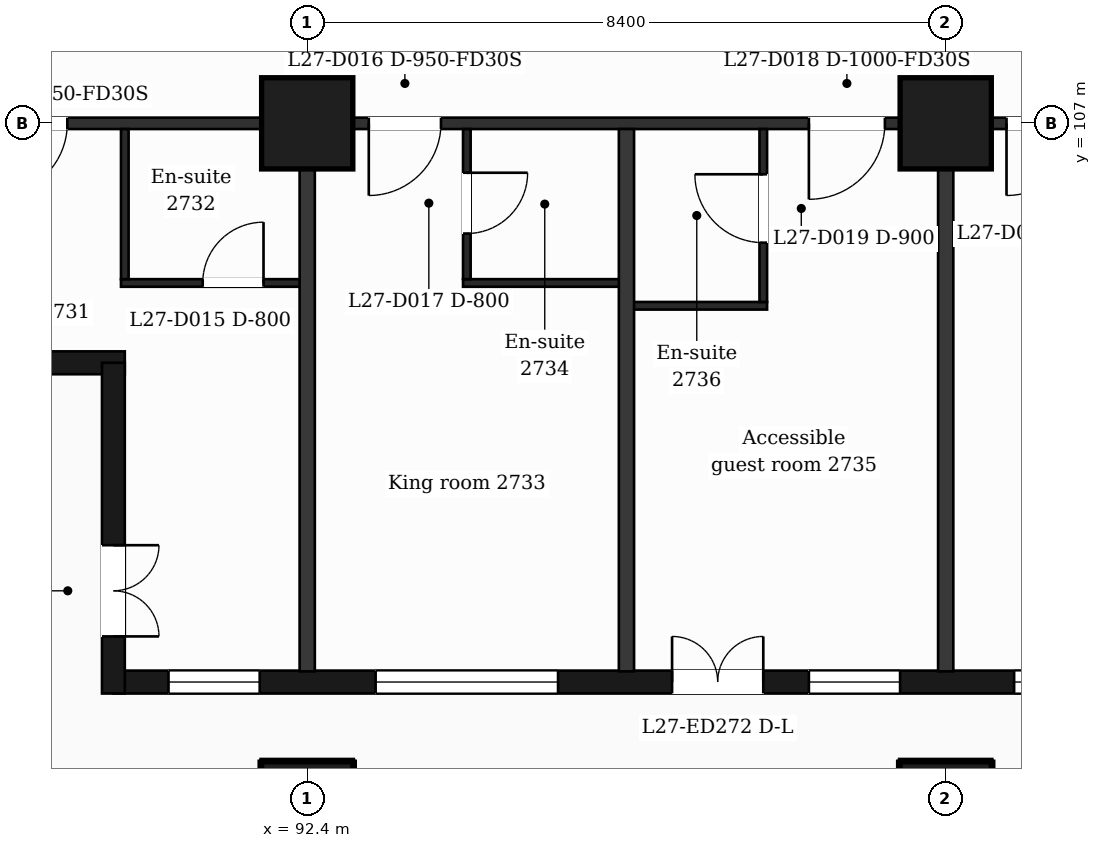
"""IFC4 building model, lengths in metres.
Left out: names, types, materials, properties, quantities, classifications, styles, units other than length and angle.
Written with IfcOpenShell. Run it as: python <this file> out.ifc"""

import sys

from ifc_helpers import new_model, si_unit, direction, frame, frame_2d, origin, origin_2d, place, context, subcontext, project, spatial, rectangle, extrude, element, fill, save


model = new_model("IFC4")
c1 = context("Model", 3, precision=1e-05, world=origin(), true_north=direction((0.0, 1.0)))
c2 = subcontext(c1, "Body", "Model", "MODEL_VIEW")
j1 = project(units=[si_unit("LENGTHUNIT", "METRE"), si_unit("PLANEANGLEUNIT", "RADIAN")], contexts=[c1])
p1 = place(None, origin())
s1 = spatial("IfcSite", under=j1, at=p1, CompositionType="ELEMENT")
p2 = place(p1, origin())
s2 = spatial("IfcBuilding", under=s1, at=p2, CompositionType="ELEMENT")
p3 = place(p2, frame((0.0, 0.0, 116.9)))
s3 = spatial("IfcBuildingStorey", under=s2, at=p3, CompositionType="ELEMENT", Elevation=116.9)
for number, where, z_axis, x_axis in (
    (1, (92.4, 98.0, 0.0), (0.0, 0.0, 1.0), (1.0, 0.0, 0.0)),
    (2, (100.8, 98.0, 0.0), (0.0, 0.0, 1.0), (1.0, 0.0, 0.0)),
    (3, (92.4, 107.0, 0.0), (0.0, 0.0, 1.0), (1.0, 0.0, 0.0)),
    (4, (100.8, 107.0, 0.0), (0.0, 0.0, 1.0), (1.0, 0.0, 0.0)),
):
    element("IfcColumn", number, at=place(p3, frame(where, z_axis=z_axis, x_axis=x_axis)), inside=s3, PredefinedType="COLUMN", context=c2, shape_type="SweptSolid", body=[
        extrude(rectangle(XDim=1.2, YDim=1.2, at=origin_2d()), origin(), (0.0, 0.0, 1.0), 3.7),
    ])
p4 = place(p3, frame((89.85, 99.65, 0.0), z_axis=(0.0, 0.0, 1.0), x_axis=(1.0, 0.0, 0.0)))
e5 = element("IfcWall", 5, at=p4, inside=s3, PredefinedType="SOLIDWALL", context=c2, shape_type="SweptSolid", body=[
    extrude(rectangle(XDim=47.25, YDim=0.3, at=frame_2d((23.625, 0.0))), origin(), (0.0, 0.0, 1.0), 3.38),
])
p5 = place(p4, frame((0.725, 0.0, 0.9)))
e6 = element("IfcOpeningElement", 6, at=p5, cuts=e5, PredefinedType="OPENING", context=c2, shape_type="SweptSolid", body=[
    extrude(rectangle(XDim=1.2, YDim=2.1, at=frame_2d((0.6, 1.05))), frame((0.0, 0.16, 0.0), z_axis=(0.0, -1.0, 0.0), x_axis=(1.0, 0.0, 0.0)), (0.0, 0.0, 1.0), 0.32),
])
p6 = place(p4, frame((3.45, 0.0, 0.9)))
e7 = element("IfcOpeningElement", 7, at=p6, cuts=e5, PredefinedType="OPENING", context=c2, shape_type="SweptSolid", body=[
    extrude(rectangle(XDim=2.4, YDim=2.1, at=frame_2d((1.2, 1.05))), frame((0.0, 0.16, 0.0), z_axis=(0.0, -1.0, 0.0), x_axis=(1.0, 0.0, 0.0)), (0.0, 0.0, 1.0), 0.32),
])
p7 = place(p4, frame((7.35, 0.0, 0.0)))
e8 = element("IfcOpeningElement", 8, at=p7, cuts=e5, PredefinedType="OPENING", context=c2, shape_type="SweptSolid", body=[
    extrude(rectangle(XDim=1.2, YDim=2.4, at=frame_2d((0.6, 1.2))), frame((0.0, 0.16, 0.0), z_axis=(0.0, -1.0, 0.0), x_axis=(1.0, 0.0, 0.0)), (0.0, 0.0, 1.0), 0.32),
])
p8 = place(p4, frame((9.15, 0.0, 0.9)))
e9 = element("IfcOpeningElement", 9, at=p8, cuts=e5, PredefinedType="OPENING", context=c2, shape_type="SweptSolid", body=[
    extrude(rectangle(XDim=1.2, YDim=2.1, at=frame_2d((0.6, 1.05))), frame((0.0, 0.16, 0.0), z_axis=(0.0, -1.0, 0.0), x_axis=(1.0, 0.0, 0.0)), (0.0, 0.0, 1.0), 0.32),
])
p9 = place(p4, frame((11.85, 0.0, 0.9)))
e10 = element("IfcOpeningElement", 10, at=p9, cuts=e5, PredefinedType="OPENING", context=c2, shape_type="SweptSolid", body=[
    extrude(rectangle(XDim=2.4, YDim=2.1, at=frame_2d((1.2, 1.05))), frame((0.0, 0.16, 0.0), z_axis=(0.0, -1.0, 0.0), x_axis=(1.0, 0.0, 0.0)), (0.0, 0.0, 1.0), 0.32),
])
p10 = place(p4, frame((16.05, 0.0, 0.9)))
e11 = element("IfcOpeningElement", 11, at=p10, cuts=e5, PredefinedType="OPENING", context=c2, shape_type="SweptSolid", body=[
    extrude(rectangle(XDim=2.4, YDim=2.1, at=frame_2d((1.2, 1.05))), frame((0.0, 0.16, 0.0), z_axis=(0.0, -1.0, 0.0), x_axis=(1.0, 0.0, 0.0)), (0.0, 0.0, 1.0), 0.32),
])
p11 = place(p4, frame((20.85, 0.0, 0.9)))
e12 = element("IfcOpeningElement", 12, at=p11, cuts=e5, PredefinedType="OPENING", context=c2, shape_type="SweptSolid", body=[
    extrude(rectangle(XDim=1.2, YDim=2.1, at=frame_2d((0.6, 1.05))), frame((0.0, 0.16, 0.0), z_axis=(0.0, -1.0, 0.0), x_axis=(1.0, 0.0, 0.0)), (0.0, 0.0, 1.0), 0.32),
])
p12 = place(p4, frame((25.05, 0.0, 0.9)))
e13 = element("IfcOpeningElement", 13, at=p12, cuts=e5, PredefinedType="OPENING", context=c2, shape_type="SweptSolid", body=[
    extrude(rectangle(XDim=1.2, YDim=2.1, at=frame_2d((0.6, 1.05))), frame((0.0, 0.16, 0.0), z_axis=(0.0, -1.0, 0.0), x_axis=(1.0, 0.0, 0.0)), (0.0, 0.0, 1.0), 0.32),
])
p13 = place(p4, frame((28.65, 0.0, 0.9)))
e14 = element("IfcOpeningElement", 14, at=p13, cuts=e5, PredefinedType="OPENING", context=c2, shape_type="SweptSolid", body=[
    extrude(rectangle(XDim=2.4, YDim=2.1, at=frame_2d((1.2, 1.05))), frame((0.0, 0.16, 0.0), z_axis=(0.0, -1.0, 0.0), x_axis=(1.0, 0.0, 0.0)), (0.0, 0.0, 1.0), 0.32),
])
p14 = place(p4, frame((32.85, 0.0, 0.9)))
e15 = element("IfcOpeningElement", 15, at=p14, cuts=e5, PredefinedType="OPENING", context=c2, shape_type="SweptSolid", body=[
    extrude(rectangle(XDim=2.4, YDim=2.1, at=frame_2d((1.2, 1.05))), frame((0.0, 0.16, 0.0), z_axis=(0.0, -1.0, 0.0), x_axis=(1.0, 0.0, 0.0)), (0.0, 0.0, 1.0), 0.32),
])
p15 = place(p4, frame((37.05, 0.0, 0.9)))
e16 = element("IfcOpeningElement", 16, at=p15, cuts=e5, PredefinedType="OPENING", context=c2, shape_type="SweptSolid", body=[
    extrude(rectangle(XDim=2.4, YDim=2.1, at=frame_2d((1.2, 1.05))), frame((0.0, 0.16, 0.0), z_axis=(0.0, -1.0, 0.0), x_axis=(1.0, 0.0, 0.0)), (0.0, 0.0, 1.0), 0.32),
])
p16 = place(p4, frame((41.25, 0.0, 0.9)))
e17 = element("IfcOpeningElement", 17, at=p16, cuts=e5, PredefinedType="OPENING", context=c2, shape_type="SweptSolid", body=[
    extrude(rectangle(XDim=2.4, YDim=2.1, at=frame_2d((1.2, 1.05))), frame((0.0, 0.16, 0.0), z_axis=(0.0, -1.0, 0.0), x_axis=(1.0, 0.0, 0.0)), (0.0, 0.0, 1.0), 0.32),
])
p17 = place(p4, frame((45.25, 0.0, 0.9)))
e18 = element("IfcOpeningElement", 18, at=p17, cuts=e5, PredefinedType="OPENING", context=c2, shape_type="SweptSolid", body=[
    extrude(rectangle(XDim=1.2, YDim=2.1, at=frame_2d((0.6, 1.05))), frame((0.0, 0.16, 0.0), z_axis=(0.0, -1.0, 0.0), x_axis=(1.0, 0.0, 0.0)), (0.0, 0.0, 1.0), 0.32),
])
p18 = place(p3, frame((86.452, 103.85, 0.0), z_axis=(0.0, 0.0, 1.0), x_axis=(1.0, 0.0, 0.0)))
e19 = element("IfcWall", 19, at=p18, inside=s3, PredefinedType="SOLIDWALL", context=c2, shape_type="SweptSolid", body=[
    extrude(rectangle(XDim=3.548, YDim=0.3, at=frame_2d((1.774, 0.0))), origin(), (0.0, 0.0, 1.0), 3.38),
])
p19 = place(p3, frame((89.85, 103.85, 0.0), z_axis=(0.0, 0.0, 1.0), x_axis=(0.0, -1.0, 0.0)))
e20 = element("IfcWall", 20, at=p19, inside=s3, PredefinedType="SOLIDWALL", context=c2, shape_type="SweptSolid", body=[
    extrude(rectangle(XDim=4.35, YDim=0.3, at=frame_2d((2.175, 0.0))), origin(), (0.0, 0.0, 1.0), 3.38),
])
p20 = place(p19, frame((2.4, 0.0, 0.0)))
e21 = element("IfcOpeningElement", 21, at=p20, cuts=e20, PredefinedType="OPENING", context=c2, shape_type="SweptSolid", body=[
    extrude(rectangle(XDim=1.2, YDim=2.4, at=frame_2d((0.6, 1.2))), frame((0.0, 0.16, 0.0), z_axis=(0.0, -1.0, 0.0), x_axis=(1.0, 0.0, 0.0)), (0.0, 0.0, 1.0), 0.32),
])
p21 = place(p3, frame((96.6, 104.6, 0.0), z_axis=(0.0, 0.0, 1.0), x_axis=(1.0, 0.0, 0.0)))
e22 = element("IfcWall", 22, at=p21, inside=s3, PredefinedType="PARTITIONING", context=c2, shape_type="SweptSolid", body=[
    extrude(rectangle(XDim=1.85, YDim=0.1, at=frame_2d((0.925, 0.0))), origin(), (0.0, 0.0, 1.0), 3.38),
])
p22 = place(p3, frame((89.95, 104.9, 0.0), z_axis=(0.0, 0.0, 1.0), x_axis=(1.0, 0.0, 0.0)))
e23 = element("IfcWall", 23, at=p22, inside=s3, PredefinedType="PARTITIONING", context=c2, shape_type="SweptSolid", body=[
    extrude(rectangle(XDim=2.45, YDim=0.1, at=frame_2d((1.225, 0.0))), origin(), (0.0, 0.0, 1.0), 3.38),
])
p23 = place(p22, frame((1.075, 0.0, 0.0)))
e24 = element("IfcOpeningElement", 24, at=p23, cuts=e23, PredefinedType="OPENING", context=c2, shape_type="SweptSolid", body=[
    extrude(rectangle(XDim=0.8, YDim=2.1, at=frame_2d((0.4, 1.05))), frame((0.0, 0.06, 0.0), z_axis=(0.0, -1.0, 0.0), x_axis=(1.0, 0.0, 0.0)), (0.0, 0.0, 1.0), 0.12),
])
p24 = place(p3, frame((94.45, 104.9, 0.0), z_axis=(0.0, 0.0, 1.0), x_axis=(1.0, 0.0, 0.0)))
e25 = element("IfcWall", 25, at=p24, inside=s3, PredefinedType="PARTITIONING", context=c2, shape_type="SweptSolid", body=[
    extrude(rectangle(XDim=2.15, YDim=0.1, at=frame_2d((1.075, 0.0))), origin(), (0.0, 0.0, 1.0), 3.38),
])
p25 = place(p3, frame((87.018, 107.0, 0.0), z_axis=(0.0, 0.0, 1.0), x_axis=(1.0, 0.0, 0.0)))
e26 = element("IfcWall", 26, at=p25, inside=s3, PredefinedType="PARTITIONING", context=c2, shape_type="SweptSolid", body=[
    extrude(rectangle(XDim=52.765, YDim=0.15, at=frame_2d((26.382, 0.0))), origin(), (0.0, 0.0, 1.0), 3.38),
])
p26 = place(p25, frame((1.276, 0.0, 0.0)))
e27 = element("IfcOpeningElement", 27, at=p26, cuts=e26, PredefinedType="OPENING", context=c2, shape_type="SweptSolid", body=[
    extrude(rectangle(XDim=0.95, YDim=2.1, at=frame_2d((0.475, 1.05))), frame((0.0, 0.085, 0.0), z_axis=(0.0, -1.0, 0.0), x_axis=(1.0, 0.0, 0.0)), (0.0, 0.0, 1.0), 0.17),
])
p27 = place(p25, frame((6.192, 0.0, 0.0)))
e28 = element("IfcOpeningElement", 28, at=p27, cuts=e26, PredefinedType="OPENING", context=c2, shape_type="SweptSolid", body=[
    extrude(rectangle(XDim=0.95, YDim=2.1, at=frame_2d((0.475, 1.05))), frame((0.0, 0.085, 0.0), z_axis=(0.0, -1.0, 0.0), x_axis=(1.0, 0.0, 0.0)), (0.0, 0.0, 1.0), 0.17),
])
p28 = place(p25, frame((11.982, 0.0, 0.0)))
e29 = element("IfcOpeningElement", 29, at=p28, cuts=e26, PredefinedType="OPENING", context=c2, shape_type="SweptSolid", body=[
    extrude(rectangle(XDim=1.0, YDim=2.1, at=frame_2d((0.5, 1.05))), frame((0.0, 0.085, 0.0), z_axis=(0.0, -1.0, 0.0), x_axis=(1.0, 0.0, 0.0)), (0.0, 0.0, 1.0), 0.17),
])
p29 = place(p25, frame((14.582, 0.0, 0.0)))
e30 = element("IfcOpeningElement", 30, at=p29, cuts=e26, PredefinedType="OPENING", context=c2, shape_type="SweptSolid", body=[
    extrude(rectangle(XDim=0.95, YDim=2.1, at=frame_2d((0.475, 1.05))), frame((0.0, 0.085, 0.0), z_axis=(0.0, -1.0, 0.0), x_axis=(1.0, 0.0, 0.0)), (0.0, 0.0, 1.0), 0.17),
])
p30 = place(p25, frame((18.257, 0.0, 0.0)))
e31 = element("IfcOpeningElement", 31, at=p30, cuts=e26, PredefinedType="OPENING", context=c2, shape_type="SweptSolid", body=[
    extrude(rectangle(XDim=0.95, YDim=2.1, at=frame_2d((0.475, 1.05))), frame((0.0, 0.085, 0.0), z_axis=(0.0, -1.0, 0.0), x_axis=(1.0, 0.0, 0.0)), (0.0, 0.0, 1.0), 0.17),
])
p31 = place(p25, frame((22.992, 0.0, 0.0)))
e32 = element("IfcOpeningElement", 32, at=p31, cuts=e26, PredefinedType="OPENING", context=c2, shape_type="SweptSolid", body=[
    extrude(rectangle(XDim=0.95, YDim=2.1, at=frame_2d((0.475, 1.05))), frame((0.0, 0.085, 0.0), z_axis=(0.0, -1.0, 0.0), x_axis=(1.0, 0.0, 0.0)), (0.0, 0.0, 1.0), 0.17),
])
p32 = place(p25, frame((26.632, 0.0, 0.0)))
e33 = element("IfcOpeningElement", 33, at=p32, cuts=e26, PredefinedType="OPENING", context=c2, shape_type="SweptSolid", body=[
    extrude(rectangle(XDim=1.0, YDim=2.1, at=frame_2d((0.5, 1.05))), frame((0.0, 0.085, 0.0), z_axis=(0.0, -1.0, 0.0), x_axis=(1.0, 0.0, 0.0)), (0.0, 0.0, 1.0), 0.17),
])
p33 = place(p25, frame((33.557, 0.0, 0.0)))
e34 = element("IfcOpeningElement", 34, at=p33, cuts=e26, PredefinedType="OPENING", context=c2, shape_type="SweptSolid", body=[
    extrude(rectangle(XDim=0.95, YDim=2.1, at=frame_2d((0.475, 1.05))), frame((0.0, 0.085, 0.0), z_axis=(0.0, -1.0, 0.0), x_axis=(1.0, 0.0, 0.0)), (0.0, 0.0, 1.0), 0.17),
])
p34 = place(p25, frame((37.182, 0.0, 0.0)))
e35 = element("IfcOpeningElement", 35, at=p34, cuts=e26, PredefinedType="OPENING", context=c2, shape_type="SweptSolid", body=[
    extrude(rectangle(XDim=0.95, YDim=2.1, at=frame_2d((0.475, 1.05))), frame((0.0, 0.085, 0.0), z_axis=(0.0, -1.0, 0.0), x_axis=(1.0, 0.0, 0.0)), (0.0, 0.0, 1.0), 0.17),
])
p35 = place(p25, frame((41.957, 0.0, 0.0)))
e36 = element("IfcOpeningElement", 36, at=p35, cuts=e26, PredefinedType="OPENING", context=c2, shape_type="SweptSolid", body=[
    extrude(rectangle(XDim=0.95, YDim=2.1, at=frame_2d((0.475, 1.05))), frame((0.0, 0.085, 0.0), z_axis=(0.0, -1.0, 0.0), x_axis=(1.0, 0.0, 0.0)), (0.0, 0.0, 1.0), 0.17),
])
p36 = place(p25, frame((45.622, 0.0, 0.0)))
e37 = element("IfcOpeningElement", 37, at=p36, cuts=e26, PredefinedType="OPENING", context=c2, shape_type="SweptSolid", body=[
    extrude(rectangle(XDim=0.95, YDim=2.1, at=frame_2d((0.475, 1.05))), frame((0.0, 0.085, 0.0), z_axis=(0.0, -1.0, 0.0), x_axis=(1.0, 0.0, 0.0)), (0.0, 0.0, 1.0), 0.17),
])
p37 = place(p25, frame((48.56, 0.0, 0.0)))
e38 = element("IfcOpeningElement", 38, at=p37, cuts=e26, PredefinedType="OPENING", context=c2, shape_type="SweptSolid", body=[
    extrude(rectangle(XDim=0.95, YDim=2.1, at=frame_2d((0.475, 1.05))), frame((0.0, 0.085, 0.0), z_axis=(0.0, -1.0, 0.0), x_axis=(1.0, 0.0, 0.0)), (0.0, 0.0, 1.0), 0.17),
])
p38 = place(p3, frame((90.0, 104.95, 0.0), z_axis=(0.0, 0.0, 1.0), x_axis=(0.0, 1.0, 0.0)))
e39 = element("IfcWall", 39, at=p38, inside=s3, PredefinedType="PARTITIONING", context=c2, shape_type="SweptSolid", body=[
    extrude(rectangle(XDim=1.975, YDim=0.1, at=frame_2d((0.988, 0.0))), origin(), (0.0, 0.0, 1.0), 3.38),
])
p39 = place(p3, frame((92.4, 99.79, 0.0), z_axis=(0.0, 0.0, 1.0), x_axis=(0.0, 1.0, 0.0)))
e40 = element("IfcWall", 40, at=p39, inside=s3, PredefinedType="PARTITIONING", context=c2, shape_type="SweptSolid", body=[
    extrude(rectangle(XDim=7.135, YDim=0.2, at=frame_2d((3.567, 0.0))), origin(), (0.0, 0.0, 1.0), 3.38),
])
p40 = place(p3, frame((94.5, 104.95, 0.0), z_axis=(0.0, 0.0, 1.0), x_axis=(0.0, 1.0, 0.0)))
e41 = element("IfcWall", 41, at=p40, inside=s3, PredefinedType="PARTITIONING", context=c2, shape_type="SweptSolid", body=[
    extrude(rectangle(XDim=1.975, YDim=0.1, at=frame_2d((0.988, 0.0))), origin(), (0.0, 0.0, 1.0), 3.38),
])
p41 = place(p40, frame((0.6, 0.0, 0.0)))
e42 = element("IfcOpeningElement", 42, at=p41, cuts=e41, PredefinedType="OPENING", context=c2, shape_type="SweptSolid", body=[
    extrude(rectangle(XDim=0.8, YDim=2.1, at=frame_2d((0.4, 1.05))), frame((0.0, 0.06, 0.0), z_axis=(0.0, -1.0, 0.0), x_axis=(1.0, 0.0, 0.0)), (0.0, 0.0, 1.0), 0.12),
])
p42 = place(p3, frame((96.6, 99.79, 0.0), z_axis=(0.0, 0.0, 1.0), x_axis=(0.0, 1.0, 0.0)))
e43 = element("IfcWall", 43, at=p42, inside=s3, PredefinedType="PARTITIONING", context=c2, shape_type="SweptSolid", body=[
    extrude(rectangle(XDim=7.135, YDim=0.2, at=frame_2d((3.567, 0.0))), origin(), (0.0, 0.0, 1.0), 3.38),
])
p43 = place(p3, frame((98.4, 104.65, 0.0), z_axis=(0.0, 0.0, 1.0), x_axis=(0.0, 1.0, 0.0)))
e44 = element("IfcWall", 44, at=p43, inside=s3, PredefinedType="PARTITIONING", context=c2, shape_type="SweptSolid", body=[
    extrude(rectangle(XDim=2.275, YDim=0.1, at=frame_2d((1.138, 0.0))), origin(), (0.0, 0.0, 1.0), 3.38),
])
p44 = place(p43, frame((0.78, 0.0, 0.0)))
e45 = element("IfcOpeningElement", 45, at=p44, cuts=e44, PredefinedType="OPENING", context=c2, shape_type="SweptSolid", body=[
    extrude(rectangle(XDim=0.9, YDim=2.1, at=frame_2d((0.45, 1.05))), frame((0.0, 0.06, 0.0), z_axis=(0.0, -1.0, 0.0), x_axis=(1.0, 0.0, 0.0)), (0.0, 0.0, 1.0), 0.12),
])
p45 = place(p3, frame((100.8, 99.79, 0.0), z_axis=(0.0, 0.0, 1.0), x_axis=(0.0, 1.0, 0.0)))
e46 = element("IfcWall", 46, at=p45, inside=s3, PredefinedType="PARTITIONING", context=c2, shape_type="SweptSolid", body=[
    extrude(rectangle(XDim=7.135, YDim=0.2, at=frame_2d((3.567, 0.0))), origin(), (0.0, 0.0, 1.0), 3.38),
])
p46 = place(p5, origin())
e47 = element("IfcWindow", 47, at=p46, inside=s3, PartitioningType="SINGLE_PANEL", PredefinedType="WINDOW", context=c2, shape_type="SweptSolid", body=[
    extrude(rectangle(XDim=1.2, YDim=2.1, at=frame_2d((0.6, 1.05))), frame((0.0, 0.03, 0.0), z_axis=(0.0, -1.0, 0.0), x_axis=(1.0, 0.0, 0.0)), (0.0, 0.0, 1.0), 0.06),
])
fill(e6, e47)
p47 = place(p6, origin())
e48 = element("IfcWindow", 48, at=p47, inside=s3, PartitioningType="SINGLE_PANEL", PredefinedType="WINDOW", context=c2, shape_type="SweptSolid", body=[
    extrude(rectangle(XDim=2.4, YDim=2.1, at=frame_2d((1.2, 1.05))), frame((0.0, 0.03, 0.0), z_axis=(0.0, -1.0, 0.0), x_axis=(1.0, 0.0, 0.0)), (0.0, 0.0, 1.0), 0.06),
])
fill(e7, e48)
p48 = place(p7, origin())
e49 = element("IfcDoor", 49, at=p48, inside=s3, OperationType="DOUBLE_DOOR_SINGLE_SWING", PredefinedType="DOOR", context=c2, shape_type="SweptSolid", body=[
    extrude(rectangle(XDim=1.2, YDim=2.4, at=frame_2d((0.6, 1.2))), frame((0.0, 0.025, 0.0), z_axis=(0.0, -1.0, 0.0), x_axis=(1.0, 0.0, 0.0)), (0.0, 0.0, 1.0), 0.05),
])
fill(e8, e49)
p49 = place(p8, origin())
e50 = element("IfcWindow", 50, at=p49, inside=s3, PartitioningType="SINGLE_PANEL", PredefinedType="WINDOW", context=c2, shape_type="SweptSolid", body=[
    extrude(rectangle(XDim=1.2, YDim=2.1, at=frame_2d((0.6, 1.05))), frame((0.0, 0.03, 0.0), z_axis=(0.0, -1.0, 0.0), x_axis=(1.0, 0.0, 0.0)), (0.0, 0.0, 1.0), 0.06),
])
fill(e9, e50)
p50 = place(p9, origin())
e51 = element("IfcWindow", 51, at=p50, inside=s3, PartitioningType="SINGLE_PANEL", PredefinedType="WINDOW", context=c2, shape_type="SweptSolid", body=[
    extrude(rectangle(XDim=2.4, YDim=2.1, at=frame_2d((1.2, 1.05))), frame((0.0, 0.03, 0.0), z_axis=(0.0, -1.0, 0.0), x_axis=(1.0, 0.0, 0.0)), (0.0, 0.0, 1.0), 0.06),
])
fill(e10, e51)
p51 = place(p20, origin())
e52 = element("IfcDoor", 52, at=p51, inside=s3, OperationType="DOUBLE_DOOR_SINGLE_SWING", PredefinedType="DOOR", context=c2, shape_type="SweptSolid", body=[
    extrude(rectangle(XDim=1.2, YDim=2.4, at=frame_2d((0.6, 1.2))), frame((0.0, 0.025, 0.0), z_axis=(0.0, -1.0, 0.0), x_axis=(1.0, 0.0, 0.0)), (0.0, 0.0, 1.0), 0.05),
])
fill(e21, e52)
p52 = place(p26, origin())
e53 = element("IfcDoor", 53, at=p52, inside=s3, OperationType="SINGLE_SWING_LEFT", PredefinedType="DOOR", context=c2, shape_type="SweptSolid", body=[
    extrude(rectangle(XDim=0.95, YDim=2.1, at=frame_2d((0.475, 1.05))), frame((0.0, 0.025, 0.0), z_axis=(0.0, -1.0, 0.0), x_axis=(1.0, 0.0, 0.0)), (0.0, 0.0, 1.0), 0.05),
])
fill(e27, e53)
p53 = place(p23, origin())
e54 = element("IfcDoor", 54, at=p53, inside=s3, OperationType="SINGLE_SWING_RIGHT", PredefinedType="DOOR", context=c2, shape_type="SweptSolid", body=[
    extrude(rectangle(XDim=0.8, YDim=2.1, at=frame_2d((0.4, 1.05))), frame((0.0, 0.025, 0.0), z_axis=(0.0, -1.0, 0.0), x_axis=(1.0, 0.0, 0.0)), (0.0, 0.0, 1.0), 0.05),
])
fill(e24, e54)
p54 = place(p27, origin())
e55 = element("IfcDoor", 55, at=p54, inside=s3, OperationType="SINGLE_SWING_LEFT", PredefinedType="DOOR", context=c2, shape_type="SweptSolid", body=[
    extrude(rectangle(XDim=0.95, YDim=2.1, at=frame_2d((0.475, 1.05))), frame((0.0, 0.025, 0.0), z_axis=(0.0, -1.0, 0.0), x_axis=(1.0, 0.0, 0.0)), (0.0, 0.0, 1.0), 0.05),
])
fill(e28, e55)
p55 = place(p41, origin())
e56 = element("IfcDoor", 56, at=p55, inside=s3, OperationType="SINGLE_SWING_RIGHT", PredefinedType="DOOR", context=c2, shape_type="SweptSolid", body=[
    extrude(rectangle(XDim=0.8, YDim=2.1, at=frame_2d((0.4, 1.05))), frame((0.0, 0.025, 0.0), z_axis=(0.0, -1.0, 0.0), x_axis=(1.0, 0.0, 0.0)), (0.0, 0.0, 1.0), 0.05),
])
fill(e42, e56)
p56 = place(p28, origin())
e57 = element("IfcDoor", 57, at=p56, inside=s3, OperationType="SINGLE_SWING_LEFT", PredefinedType="DOOR", context=c2, shape_type="SweptSolid", body=[
    extrude(rectangle(XDim=1.0, YDim=2.1, at=frame_2d((0.5, 1.05))), frame((0.0, 0.025, 0.0), z_axis=(0.0, -1.0, 0.0), x_axis=(1.0, 0.0, 0.0)), (0.0, 0.0, 1.0), 0.05),
])
fill(e29, e57)
p57 = place(p44, origin())
e58 = element("IfcDoor", 58, at=p57, inside=s3, OperationType="SINGLE_SWING_RIGHT", PredefinedType="DOOR", context=c2, shape_type="SweptSolid", body=[
    extrude(rectangle(XDim=0.9, YDim=2.1, at=frame_2d((0.45, 1.05))), frame((0.0, 0.025, 0.0), z_axis=(0.0, -1.0, 0.0), x_axis=(1.0, 0.0, 0.0)), (0.0, 0.0, 1.0), 0.05),
])
fill(e45, e58)
p58 = place(p29, origin())
e59 = element("IfcDoor", 59, at=p58, inside=s3, OperationType="SINGLE_SWING_LEFT", PredefinedType="DOOR", context=c2, shape_type="SweptSolid", body=[
    extrude(rectangle(XDim=0.95, YDim=2.1, at=frame_2d((0.475, 1.05))), frame((0.0, 0.025, 0.0), z_axis=(0.0, -1.0, 0.0), x_axis=(1.0, 0.0, 0.0)), (0.0, 0.0, 1.0), 0.05),
])
fill(e30, e59)
save(model, sys.argv[1])
